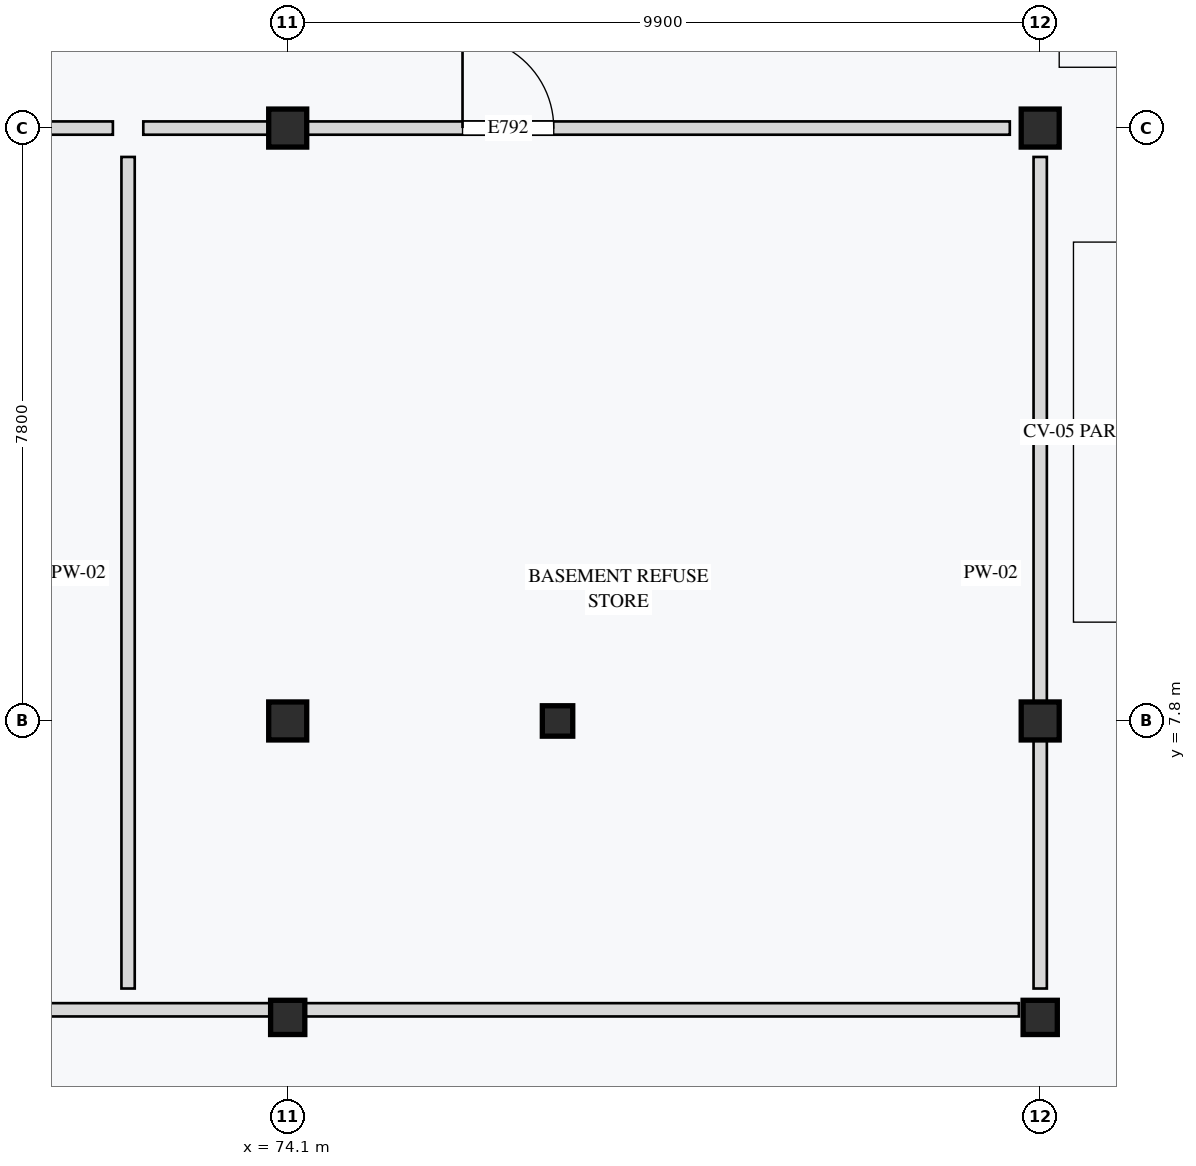
"""IFC4 building model, lengths in metres.
Left out: names, types, materials, properties, quantities, classifications, styles, units other than length and angle.
Written with IfcOpenShell. Run it as: python <this file> out.ifc"""

import sys

from ifc_helpers import new_model, si_unit, direction, frame, frame_2d, origin, origin_2d, place, context, subcontext, project, spatial, rectangle, extrude, element, fill, save


model = new_model("IFC4")
c1 = context("Model", 3, precision=1e-05, world=origin(), true_north=direction((0.0, 1.0)))
c2 = subcontext(c1, "Body", "Model", "MODEL_VIEW")
j1 = project(units=[si_unit("LENGTHUNIT", "METRE"), si_unit("PLANEANGLEUNIT", "RADIAN")], contexts=[c1])
p1 = place(None, origin())
s1 = spatial("IfcSite", under=j1, at=p1, CompositionType="ELEMENT")
p2 = place(p1, origin())
s2 = spatial("IfcBuilding", under=s1, at=p2, CompositionType="ELEMENT")
p3 = place(p2, frame((0.0, 0.0, -3.8)))
s3 = spatial("IfcBuildingStorey", under=s2, at=p3, CompositionType="ELEMENT", Elevation=-3.8)
for number, where, z_axis, x_axis in (
    (1, (74.1, 7.8, 0.0), (0.0, 0.0, 1.0), (1.0, 0.0, 0.0)),
    (2, (74.1, 15.6, 0.0), (0.0, 0.0, 1.0), (1.0, 0.0, 0.0)),
    (3, (84.0, 7.8, 0.0), (0.0, 0.0, 1.0), (1.0, 0.0, 0.0)),
    (4, (84.0, 15.6, 0.0), (0.0, 0.0, 1.0), (1.0, 0.0, 0.0)),
):
    element("IfcColumn", number, at=place(p3, frame(where, z_axis=z_axis, x_axis=x_axis)), inside=s3, PredefinedType="COLUMN", context=c2, shape_type="SweptSolid", body=[
        extrude(rectangle(XDim=0.5, YDim=0.5, at=origin_2d()), origin(), (0.0, 0.0, 1.0), 3.8),
    ])
p4 = place(p3, frame((77.65, 7.8, 0.0), z_axis=(0.0, 0.0, 1.0), x_axis=(1.0, 0.0, 0.0)))
e5 = element("IfcColumn", 5, at=p4, inside=s3, PredefinedType="COLUMN", context=c2, shape_type="SweptSolid", body=[
    extrude(rectangle(XDim=0.4, YDim=0.4, at=origin_2d()), origin(), (0.0, 0.0, 1.0), 3.8),
])
for number, where, z_axis, x_axis in (
    (6, (74.1, 3.9, 0.0), (0.0, 0.0, 1.0), (1.0, 0.0, 0.0)),
    (7, (84.0, 3.9, 0.0), (0.0, 0.0, 1.0), (1.0, 0.0, 0.0)),
):
    element("IfcColumn", number, at=place(p3, frame(where, z_axis=z_axis, x_axis=x_axis)), inside=s3, PredefinedType="COLUMN", context=c2, shape_type="SweptSolid", body=[
        extrude(rectangle(XDim=0.45, YDim=0.45, at=origin_2d()), origin(), (0.0, 0.0, 1.0), 3.8),
    ])
p5 = place(p3, frame((56.8, 15.6, 0.0), z_axis=(0.0, 0.0, 1.0), x_axis=(1.0, 0.0, 0.0)))
e8 = element("IfcWall", 8, at=p5, inside=s3, PredefinedType="PARTITIONING", context=c2, shape_type="SweptSolid", body=[
    extrude(rectangle(XDim=15.0, YDim=0.175, at=frame_2d((7.5, 0.0))), origin(), (0.0, 0.0, 1.0), 3.05),
])
p6 = place(p5, frame((2.8, 0.0, 0.0)))
e9 = element("IfcOpeningElement", 9, at=p6, cuts=e8, PredefinedType="OPENING", context=c2, shape_type="SweptSolid", body=[
    extrude(rectangle(XDim=1.1, YDim=2.15, at=frame_2d((0.55, 1.075))), frame((0.0, 0.097, 0.0), z_axis=(0.0, -1.0, 0.0), x_axis=(1.0, 0.0, 0.0)), (0.0, 0.0, 1.0), 0.195),
])
p7 = place(p3, frame((72.2, 15.6, 0.0), z_axis=(0.0, 0.0, 1.0), x_axis=(1.0, 0.0, 0.0)))
e10 = element("IfcWall", 10, at=p7, inside=s3, PredefinedType="PARTITIONING", context=c2, shape_type="SweptSolid", body=[
    extrude(rectangle(XDim=11.4, YDim=0.175, at=frame_2d((5.7, 0.0))), origin(), (0.0, 0.0, 1.0), 3.05),
])
p8 = place(p7, frame((4.2, 0.0, 0.0)))
e11 = element("IfcOpeningElement", 11, at=p8, cuts=e10, PredefinedType="OPENING", context=c2, shape_type="SweptSolid", body=[
    extrude(rectangle(XDim=1.2, YDim=2.18, at=frame_2d((0.6, 1.09))), frame((0.0, 0.097, 0.0), z_axis=(0.0, -1.0, 0.0), x_axis=(1.0, 0.0, 0.0)), (0.0, 0.0, 1.0), 0.195),
])
p9 = place(p3, frame((63.945, 4.0, 0.0), z_axis=(0.0, 0.0, 1.0), x_axis=(1.0, 0.0, 0.0)))
e12 = element("IfcWall", 12, at=p9, inside=s3, PredefinedType="PARTITIONING", context=c2, shape_type="SweptSolid", body=[
    extrude(rectangle(XDim=19.775, YDim=0.175, at=frame_2d((9.887, 0.0))), origin(), (0.0, 0.0, 1.0), 3.05),
])
p10 = place(p3, frame((72.0, 4.28, 0.0), z_axis=(0.0, 0.0, 1.0), x_axis=(0.0, 1.0, 0.0)))
e13 = element("IfcWall", 13, at=p10, inside=s3, PredefinedType="PARTITIONING", context=c2, shape_type="SweptSolid", body=[
    extrude(rectangle(XDim=10.94, YDim=0.175, at=frame_2d((5.47, 0.0))), origin(), (0.0, 0.0, 1.0), 3.52),
])
p11 = place(p3, frame((84.0, 4.28, 0.0), z_axis=(0.0, 0.0, 1.0), x_axis=(0.0, 1.0, 0.0)))
e14 = element("IfcWall", 14, at=p11, inside=s3, PredefinedType="PARTITIONING", context=c2, shape_type="SweptSolid", body=[
    extrude(rectangle(XDim=10.94, YDim=0.175, at=frame_2d((5.47, 0.0))), origin(), (0.0, 0.0, 1.0), 3.1),
])
p12 = place(p8, origin())
e15 = element("IfcDoor", 15, at=p12, inside=s3, OperationType="SINGLE_SWING_LEFT", PredefinedType="DOOR", context=c2, shape_type="SweptSolid", body=[
    extrude(rectangle(XDim=1.2, YDim=2.18, at=frame_2d((0.6, 1.09))), frame((0.0, 0.025, 0.0), z_axis=(0.0, -1.0, 0.0), x_axis=(1.0, 0.0, 0.0)), (0.0, 0.0, 1.0), 0.05),
])
fill(e11, e15)
save(model, sys.argv[1])
